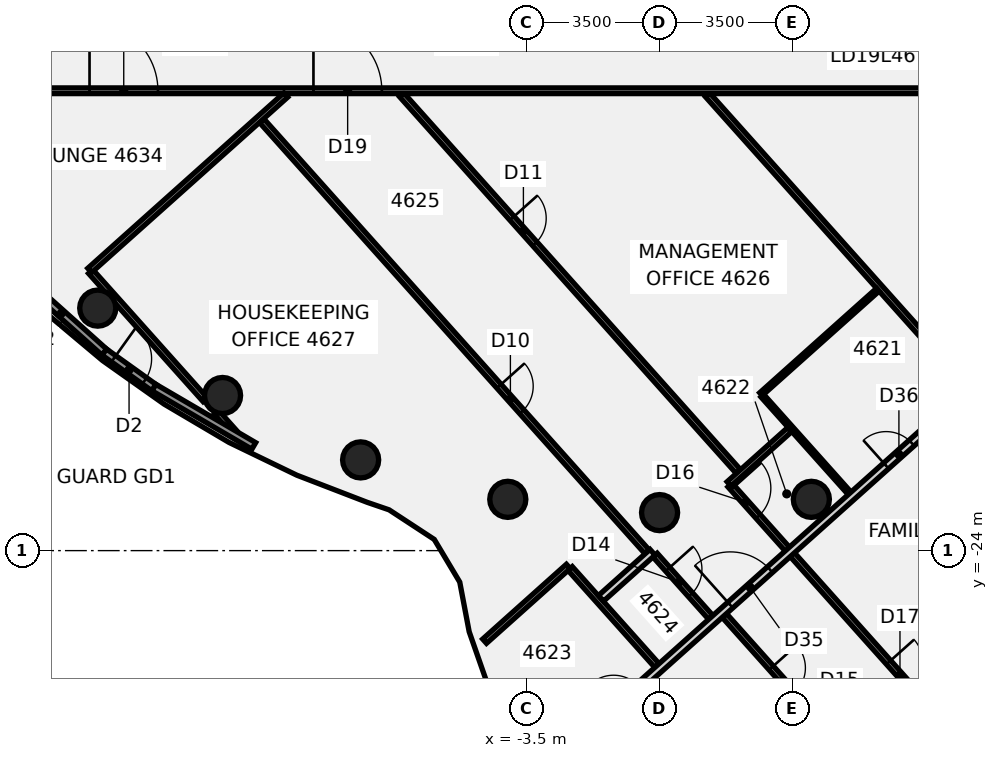
"""IFC4 building model, lengths in metres.
Left out: names, types, materials, properties, quantities, classifications, styles, units other than length and angle.
Written with IfcOpenShell. Run it as: python <this file> out.ifc"""

import sys

from ifc_helpers import new_model, si_unit, direction, frame, frame_2d, origin, origin_2d, place, context, subcontext, project, spatial, rectangle, circle, extrude, element, fill, save


model = new_model("IFC4")
c1 = context("Model", 3, precision=1e-05, world=origin(), true_north=direction((0.0, 1.0)))
c2 = subcontext(c1, "Body", "Model", "MODEL_VIEW")
j1 = project(units=[si_unit("LENGTHUNIT", "METRE"), si_unit("PLANEANGLEUNIT", "RADIAN")], contexts=[c1])
p1 = place(None, origin())
s1 = spatial("IfcSite", under=j1, at=p1, CompositionType="ELEMENT")
p2 = place(p1, origin())
s2 = spatial("IfcBuilding", under=s1, at=p2, CompositionType="ELEMENT")
p3 = place(p2, frame((0.0, 0.0, 186.1)))
s3 = spatial("IfcBuildingStorey", under=s2, at=p3, CompositionType="ELEMENT", Elevation=186.1)
for number, where, z_axis, x_axis in (
    (1, (-14.784, -17.619, -0.14), (0.0, 0.0, 1.0), (1.0, 0.0, 0.0)),
    (2, (-11.5, -19.919, -0.14), (0.0, 0.0, 1.0), (1.0, 0.0, 0.0)),
    (3, (-7.866, -21.613, -0.14), (0.0, 0.0, 1.0), (1.0, 0.0, 0.0)),
    (4, (-3.994, -22.651, -0.14), (0.0, 0.0, 1.0), (1.0, 0.0, 0.0)),
    (5, (0.0, -23.0, -0.14), (0.0, 0.0, 1.0), (1.0, 0.0, 0.0)),
    (6, (3.994, -22.651, -0.14), (0.0, 0.0, 1.0), (1.0, 0.0, 0.0)),
):
    element("IfcColumn", number, at=place(p3, frame(where, z_axis=z_axis, x_axis=x_axis)), inside=s3, PredefinedType="COLUMN", context=c2, shape_type="SweptSolid", body=[
        extrude(circle(Radius=0.475, at=origin_2d()), origin(), (0.0, 0.0, 1.0), 3.6),
    ])
p4 = place(p3, frame((-14.969, -16.657, 0.0), z_axis=(0.0, 0.0, 1.0), x_axis=(0.666348223985, -0.745640693895, 0.0)))
e7 = element("IfcWall", 7, at=p4, inside=s3, PredefinedType="PARTITIONING", context=c2, shape_type="SweptSolid", body=[
    extrude(rectangle(XDim=4.523, YDim=0.15, at=frame_2d((2.261, 0.0))), origin(), (0.0, 0.0, 1.0), 2.864),
])
p5 = place(p3, frame((-11.659, -20.361, 0.0), z_axis=(0.0, 0.0, 1.0), x_axis=(0.666420937465, -0.74557570649, 0.0)))
e8 = element("IfcWall", 8, at=p5, inside=s3, PredefinedType="PARTITIONING", context=c2, shape_type="SweptSolid", body=[
    extrude(rectangle(XDim=0.706, YDim=0.15, at=frame_2d((0.353, 0.0))), origin(), (0.0, 0.0, 1.0), 2.864),
])
p6 = place(p3, frame((-10.47, -12.688, 0.0), z_axis=(0.0, 0.0, 1.0), x_axis=(0.666418267017, -0.745578093419, 0.0)))
e9 = element("IfcWall", 9, at=p6, inside=s3, PredefinedType="PARTITIONING", context=c2, shape_type="SweptSolid", body=[
    extrude(rectangle(XDim=15.22, YDim=0.15, at=frame_2d((7.61, 0.0))), origin(), (0.0, 0.0, 1.0), 2.864),
])
p7 = place(p6, frame((9.37, 0.0, 0.0)))
e10 = element("IfcOpeningElement", 10, at=p7, cuts=e9, PredefinedType="OPENING", context=c2, shape_type="SweptSolid", body=[
    extrude(rectangle(XDim=0.9, YDim=2.1, at=frame_2d((0.45, 1.05))), frame((0.0, 0.085, 0.0), z_axis=(0.0, -1.0, 0.0), x_axis=(1.0, 0.0, 0.0)), (0.0, 0.0, 1.0), 0.17),
])
p8 = place(p3, frame((-6.785, -12.008, 0.0), z_axis=(0.0, 0.0, 1.0), x_axis=(0.666416805169, -0.745579400056, 0.0)))
e11 = element("IfcWall", 11, at=p8, inside=s3, PredefinedType="PARTITIONING", context=c2, shape_type="SweptSolid", body=[
    extrude(rectangle(XDim=13.292, YDim=0.15, at=frame_2d((6.646, 0.0))), origin(), (0.0, 0.0, 1.0), 2.864),
])
p9 = place(p8, frame((4.355, 0.0, 0.0)))
e12 = element("IfcOpeningElement", 12, at=p9, cuts=e11, PredefinedType="OPENING", context=c2, shape_type="SweptSolid", body=[
    extrude(rectangle(XDim=0.9, YDim=2.1, at=frame_2d((0.45, 1.05))), frame((0.0, 0.085, 0.0), z_axis=(0.0, -1.0, 0.0), x_axis=(1.0, 0.0, 0.0)), (0.0, 0.0, 1.0), 0.17),
])
p10 = place(p3, frame((-2.352, -24.471, 0.0), z_axis=(0.0, 0.0, 1.0), x_axis=(0.666436387123, -0.745561896772, 0.0)))
e13 = element("IfcWall", 13, at=p10, inside=s3, PredefinedType="PARTITIONING", context=c2, shape_type="SweptSolid", body=[
    extrude(rectangle(XDim=3.425, YDim=0.15, at=frame_2d((1.712, 0.0))), origin(), (0.0, 0.0, 1.0), 2.864),
])
p11 = place(p3, frame((-0.118, -24.118, 0.0), z_axis=(0.0, 0.0, 1.0), x_axis=(0.666262717409, -0.745717098765, 0.0)))
e14 = element("IfcWall", 14, at=p11, inside=s3, PredefinedType="PARTITIONING", context=c2, shape_type="SweptSolid", body=[
    extrude(rectangle(XDim=2.2, YDim=0.15, at=frame_2d((1.1, 0.0))), origin(), (0.0, 0.0, 1.0), 2.864),
])
p12 = place(p11, frame((0.5, 0.0, 0.0)))
e15 = element("IfcOpeningElement", 15, at=p12, cuts=e14, PredefinedType="OPENING", context=c2, shape_type="SweptSolid", body=[
    extrude(rectangle(XDim=0.9, YDim=2.1, at=frame_2d((0.45, 1.05))), frame((0.0, 0.085, 0.0), z_axis=(0.0, -1.0, 0.0), x_axis=(1.0, 0.0, 0.0)), (0.0, 0.0, 1.0), 0.17),
])
p13 = place(p3, frame((1.263, -12.008, 0.0), z_axis=(0.0, 0.0, 1.0), x_axis=(0.666447481512, -0.745551979668, 0.0)))
e16 = element("IfcWall", 16, at=p13, inside=s3, PredefinedType="PARTITIONING", context=c2, shape_type="SweptSolid", body=[
    extrude(rectangle(XDim=14.651, YDim=0.15, at=frame_2d((7.325, 0.0))), origin(), (0.0, 0.0, 1.0), 2.864),
])
p14 = place(p3, frame((1.705, -25.708, 0.0), z_axis=(0.0, 0.0, 1.0), x_axis=(0.666414011684, -0.745581896931, 0.0)))
e17 = element("IfcWall", 17, at=p14, inside=s3, PredefinedType="PARTITIONING", context=c2, shape_type="SweptSolid", body=[
    extrude(rectangle(XDim=3.861, YDim=0.15, at=frame_2d((1.93, 0.0))), origin(), (0.0, 0.0, 1.0), 2.864),
])
p15 = place(p14, frame((1.85, 0.0, 0.0)))
e18 = element("IfcOpeningElement", 18, at=p15, cuts=e17, PredefinedType="OPENING", context=c2, shape_type="SweptSolid", body=[
    extrude(rectangle(XDim=0.9, YDim=2.1, at=frame_2d((0.45, 1.05))), frame((0.0, 0.085, 0.0), z_axis=(0.0, -1.0, 0.0), x_axis=(1.0, 0.0, 0.0)), (0.0, 0.0, 1.0), 0.17),
])
p16 = place(p3, frame((1.855, -22.274, 0.0), z_axis=(0.0, 0.0, 1.0), x_axis=(0.666398150621, -0.74559607352, 0.0)))
e19 = element("IfcWall", 19, at=p16, inside=s3, PredefinedType="PARTITIONING", context=c2, shape_type="SweptSolid", body=[
    extrude(rectangle(XDim=15.78, YDim=0.15, at=frame_2d((7.89, 0.0))), origin(), (0.0, 0.0, 1.0), 2.864),
])
p17 = place(p16, frame((0.11, 0.0, 0.0)))
e20 = element("IfcOpeningElement", 20, at=p17, cuts=e19, PredefinedType="OPENING", context=c2, shape_type="SweptSolid", body=[
    extrude(rectangle(XDim=1.0, YDim=2.1, at=frame_2d((0.5, 1.05))), frame((0.0, 0.085, 0.0), z_axis=(0.0, -1.0, 0.0), x_axis=(1.0, 0.0, 0.0)), (0.0, 0.0, 1.0), 0.17),
])
p18 = place(p16, frame((6.26, 0.0, 0.0)))
e21 = element("IfcOpeningElement", 21, at=p18, cuts=e19, PredefinedType="OPENING", context=c2, shape_type="SweptSolid", body=[
    extrude(rectangle(XDim=0.9, YDim=2.1, at=frame_2d((0.45, 1.05))), frame((0.0, 0.085, 0.0), z_axis=(0.0, -1.0, 0.0), x_axis=(1.0, 0.0, 0.0)), (0.0, 0.0, 1.0), 0.17),
])
p19 = place(p16, frame((14.31, 0.0, 0.0)))
e22 = element("IfcOpeningElement", 22, at=p19, cuts=e19, PredefinedType="OPENING", context=c2, shape_type="SweptSolid", body=[
    extrude(rectangle(XDim=0.9, YDim=2.1, at=frame_2d((0.45, 1.05))), frame((0.0, 0.085, 0.0), z_axis=(0.0, -1.0, 0.0), x_axis=(1.0, 0.0, 0.0)), (0.0, 0.0, 1.0), 0.17),
])
p20 = place(p3, frame((2.705, -19.924, 0.0), z_axis=(0.0, 0.0, 1.0), x_axis=(0.666455053582, -0.74554521094, 0.0)))
e23 = element("IfcWall", 23, at=p20, inside=s3, PredefinedType="PARTITIONING", context=c2, shape_type="SweptSolid", body=[
    extrude(rectangle(XDim=3.445, YDim=0.1, at=frame_2d((1.722, 0.0))), origin(), (0.0, 0.0, 1.0), 2.864),
])
p21 = place(p3, frame((-17.1, -11.9, 0.0), z_axis=(0.0, 0.0, 1.0), x_axis=(1.0, 0.0, 0.0)))
e24 = element("IfcWall", 24, at=p21, inside=s3, PredefinedType="PARTITIONING", context=c2, shape_type="SweptSolid", body=[
    extrude(rectangle(XDim=34.165, YDim=0.15, at=frame_2d((17.083, 0.0))), origin(), (0.0, 0.0, 1.0), 2.864),
])
p22 = place(p21, frame((7.992, 0.0, 0.0)))
e25 = element("IfcOpeningElement", 25, at=p22, cuts=e24, PredefinedType="OPENING", context=c2, shape_type="SweptSolid", body=[
    extrude(rectangle(XDim=1.8, YDim=2.1, at=frame_2d((0.9, 1.05))), frame((0.0, 0.085, 0.0), z_axis=(0.0, -1.0, 0.0), x_axis=(1.0, 0.0, 0.0)), (0.0, 0.0, 1.0), 0.17),
])
p23 = place(p21, frame((2.1, 0.0, 0.0)))
e26 = element("IfcOpeningElement", 26, at=p23, cuts=e24, PredefinedType="OPENING", context=c2, shape_type="SweptSolid", body=[
    extrude(rectangle(XDim=1.8, YDim=2.1, at=frame_2d((0.9, 1.05))), frame((0.0, 0.085, 0.0), z_axis=(0.0, -1.0, 0.0), x_axis=(1.0, 0.0, 0.0)), (0.0, 0.0, 1.0), 0.17),
])
p24 = place(p21, frame((25.316, 0.0, 0.0)))
e27 = element("IfcOpeningElement", 27, at=p24, cuts=e24, PredefinedType="OPENING", context=c2, shape_type="SweptSolid", body=[
    extrude(rectangle(XDim=1.8, YDim=2.1, at=frame_2d((0.9, 1.05))), frame((0.0, 0.085, 0.0), z_axis=(0.0, -1.0, 0.0), x_axis=(1.0, 0.0, 0.0)), (0.0, 0.0, 1.0), 0.17),
])
p25 = place(p3, frame((-14.996, -16.627, 0.0), z_axis=(0.0, 0.0, 1.0), x_axis=(0.74550136181, 0.666504103167, 0.0)))
e28 = element("IfcWall", 28, at=p25, inside=s3, PredefinedType="PARTITIONING", context=c2, shape_type="SweptSolid", body=[
    extrude(rectangle(XDim=6.923, YDim=0.15, at=frame_2d((3.461, 0.0))), origin(), (0.0, 0.0, 1.0), 2.864),
])
p26 = place(p3, frame((-4.604, -26.383, 0.0), z_axis=(0.0, 0.0, 1.0), x_axis=(0.745591433962, 0.66640334153, 0.0)))
e29 = element("IfcWall", 29, at=p26, inside=s3, PredefinedType="PARTITIONING", context=c2, shape_type="SweptSolid", body=[
    extrude(rectangle(XDim=2.954, YDim=0.15, at=frame_2d((1.477, 0.0))), origin(), (0.0, 0.0, 1.0), 2.864),
])
p27 = place(p3, frame((2.668, -19.883, 0.0), z_axis=(0.0, 0.0, 1.0), x_axis=(0.745587906821, 0.666407287777, 0.0)))
e30 = element("IfcWall", 30, at=p27, inside=s3, PredefinedType="PARTITIONING", context=c2, shape_type="SweptSolid", body=[
    extrude(rectangle(XDim=4.125, YDim=0.1, at=frame_2d((2.063, 0.0))), origin(), (0.0, 0.0, 1.0), 2.864),
])
p28 = place(p3, frame((-2.388, -29.231, 0.0), z_axis=(0.0, 0.0, 1.0), x_axis=(0.745635079119, 0.666354506841, 0.0)))
e31 = element("IfcWall", 31, at=p28, inside=s3, PredefinedType="PARTITIONING", context=c2, shape_type="SweptSolid", body=[
    extrude(rectangle(XDim=14.119, YDim=0.2, at=frame_2d((7.06, 0.0))), origin(), (0.0, 0.0, 1.0), 2.864),
])
p29 = place(p28, frame((5.699, 0.0, 0.0)))
e32 = element("IfcOpeningElement", 32, at=p29, cuts=e31, PredefinedType="OPENING", context=c2, shape_type="SweptSolid", body=[
    extrude(rectangle(XDim=1.4, YDim=2.1, at=frame_2d((0.7, 1.05))), frame((0.0, 0.11, 0.0), z_axis=(0.0, -1.0, 0.0), x_axis=(1.0, 0.0, 0.0)), (0.0, 0.0, 1.0), 0.22),
])
p30 = place(p28, frame((11.199, 0.0, 0.0)))
e33 = element("IfcOpeningElement", 33, at=p30, cuts=e31, PredefinedType="OPENING", context=c2, shape_type="SweptSolid", body=[
    extrude(rectangle(XDim=0.9, YDim=2.1, at=frame_2d((0.45, 1.05))), frame((0.0, 0.11, 0.0), z_axis=(0.0, -1.0, 0.0), x_axis=(1.0, 0.0, 0.0)), (0.0, 0.0, 1.0), 0.22),
])
p31 = place(p28, frame((1.579, 0.0, 0.0)))
e34 = element("IfcOpeningElement", 34, at=p31, cuts=e31, PredefinedType="OPENING", context=c2, shape_type="SweptSolid", body=[
    extrude(rectangle(XDim=0.9, YDim=2.1, at=frame_2d((0.45, 1.05))), frame((0.0, 0.11, 0.0), z_axis=(0.0, -1.0, 0.0), x_axis=(1.0, 0.0, 0.0)), (0.0, 0.0, 1.0), 0.22),
])
p32 = place(p3, frame((-1.542, -25.257, 0.0), z_axis=(0.0, 0.0, 1.0), x_axis=(0.745490239636, 0.666516543387, 0.0)))
e35 = element("IfcWall", 35, at=p32, inside=s3, PredefinedType="PARTITIONING", context=c2, shape_type="SweptSolid", body=[
    extrude(rectangle(XDim=1.821, YDim=0.2, at=frame_2d((0.91, 0.0))), origin(), (0.0, 0.0, 1.0), 2.864),
])
p33 = place(p3, frame((1.827, -22.243, 0.0), z_axis=(0.0, 0.0, 1.0), x_axis=(0.74553667449, 0.666464602953, 0.0)))
e36 = element("IfcWall", 36, at=p33, inside=s3, PredefinedType="PARTITIONING", context=c2, shape_type="SweptSolid", body=[
    extrude(rectangle(XDim=2.14, YDim=0.15, at=frame_2d((1.07, 0.0))), origin(), (0.0, 0.0, 1.0), 2.864),
])
p34 = place(p3, frame((-16.881, -16.743, 0.0), z_axis=(0.0, 0.0, 1.0), x_axis=(0.744845286736, -0.667237213311, 0.0)))
e37 = element("IfcWall", 37, at=p34, inside=s3, PredefinedType="SOLIDWALL", context=c2, shape_type="SweptSolid", body=[
    extrude(rectangle(XDim=3.048, YDim=0.2, at=frame_2d((1.524, 0.0))), origin(), (0.0, 0.0, 1.0), 3.46),
])
p35 = place(p3, frame((-13.309, -19.708, 0.0), z_axis=(0.0, 0.0, 1.0), x_axis=(0.863304849932, -0.504682807399, 0.0)))
e38 = element("IfcWall", 38, at=p35, inside=s3, PredefinedType="SOLIDWALL", context=c2, shape_type="SweptSolid", body=[
    extrude(rectangle(XDim=3.047, YDim=0.2, at=frame_2d((1.523, 0.0))), origin(), (0.0, 0.0, 1.0), 3.46),
])
p36 = place(p3, frame((-14.611, -18.777, 0.0), z_axis=(0.0, 0.0, 1.0), x_axis=(0.81345495277, -0.58162792214, 0.0)))
e39 = element("IfcWall", 39, at=p36, inside=s3, PredefinedType="SOLIDWALL", context=c2, shape_type="SweptSolid", body=[
    extrude(rectangle(XDim=1.6, YDim=0.2, at=frame_2d((0.8, 0.0))), origin(), (0.0, 0.0, 1.0), 3.46),
])
p37 = place(p36, frame((0.3, 0.0, 0.0)))
e40 = element("IfcOpeningElement", 40, at=p37, cuts=e39, PredefinedType="OPENING", context=c2, shape_type="SweptSolid", body=[
    extrude(rectangle(XDim=1.0, YDim=2.4, at=frame_2d((0.5, 1.2))), frame((0.0, 0.11, 0.0), z_axis=(0.0, -1.0, 0.0), x_axis=(1.0, 0.0, 0.0)), (0.0, 0.0, 1.0), 0.22),
])
p38 = place(p7, frame((0.9, 0.0, 0.0), z_axis=(0.0, 0.0, 1.0), x_axis=(-1.0, 0.0, 0.0)))
e41 = element("IfcDoor", 41, at=p38, inside=s3, OperationType="SINGLE_SWING_RIGHT", PredefinedType="DOOR", context=c2, shape_type="SweptSolid", body=[
    extrude(rectangle(XDim=0.9, YDim=2.1, at=frame_2d((0.45, 1.05))), frame((0.0, 0.025, 0.0), z_axis=(0.0, -1.0, 0.0), x_axis=(1.0, 0.0, 0.0)), (0.0, 0.0, 1.0), 0.05),
])
fill(e10, e41)
p39 = place(p9, origin())
e42 = element("IfcDoor", 42, at=p39, inside=s3, OperationType="SINGLE_SWING_RIGHT", PredefinedType="DOOR", context=c2, shape_type="SweptSolid", body=[
    extrude(rectangle(XDim=0.9, YDim=2.1, at=frame_2d((0.45, 1.05))), frame((0.0, 0.025, 0.0), z_axis=(0.0, -1.0, 0.0), x_axis=(1.0, 0.0, 0.0)), (0.0, 0.0, 1.0), 0.05),
])
fill(e12, e42)
p40 = place(p12, frame((0.9, 0.0, 0.0), z_axis=(0.0, 0.0, 1.0), x_axis=(-1.0, 0.0, 0.0)))
e43 = element("IfcDoor", 43, at=p40, inside=s3, OperationType="SINGLE_SWING_LEFT", PredefinedType="DOOR", context=c2, shape_type="SweptSolid", body=[
    extrude(rectangle(XDim=0.9, YDim=2.1, at=frame_2d((0.45, 1.05))), frame((0.0, 0.025, 0.0), z_axis=(0.0, -1.0, 0.0), x_axis=(1.0, 0.0, 0.0)), (0.0, 0.0, 1.0), 0.05),
])
fill(e15, e43)
p41 = place(p15, frame((0.9, 0.0, 0.0), z_axis=(0.0, 0.0, 1.0), x_axis=(-1.0, 0.0, 0.0)))
e44 = element("IfcDoor", 44, at=p41, inside=s3, OperationType="SINGLE_SWING_RIGHT", PredefinedType="DOOR", context=c2, shape_type="SweptSolid", body=[
    extrude(rectangle(XDim=0.9, YDim=2.1, at=frame_2d((0.45, 1.05))), frame((0.0, 0.025, 0.0), z_axis=(0.0, -1.0, 0.0), x_axis=(1.0, 0.0, 0.0)), (0.0, 0.0, 1.0), 0.05),
])
fill(e18, e44)
p42 = place(p17, origin())
e45 = element("IfcDoor", 45, at=p42, inside=s3, OperationType="SINGLE_SWING_RIGHT", PredefinedType="DOOR", context=c2, shape_type="SweptSolid", body=[
    extrude(rectangle(XDim=1.0, YDim=2.1, at=frame_2d((0.5, 1.05))), frame((0.0, 0.025, 0.0), z_axis=(0.0, -1.0, 0.0), x_axis=(1.0, 0.0, 0.0)), (0.0, 0.0, 1.0), 0.05),
])
fill(e20, e45)
p43 = place(p18, origin())
e46 = element("IfcDoor", 46, at=p43, inside=s3, OperationType="SINGLE_SWING_RIGHT", PredefinedType="DOOR", context=c2, shape_type="SweptSolid", body=[
    extrude(rectangle(XDim=0.9, YDim=2.1, at=frame_2d((0.45, 1.05))), frame((0.0, 0.025, 0.0), z_axis=(0.0, -1.0, 0.0), x_axis=(1.0, 0.0, 0.0)), (0.0, 0.0, 1.0), 0.05),
])
fill(e21, e46)
p44 = place(p22, origin())
e47 = element("IfcDoor", 47, at=p44, inside=s3, OperationType="DOUBLE_DOOR_SINGLE_SWING", PredefinedType="DOOR", context=c2, shape_type="SweptSolid", body=[
    extrude(rectangle(XDim=1.8, YDim=2.1, at=frame_2d((0.9, 1.05))), frame((0.0, 0.025, 0.0), z_axis=(0.0, -1.0, 0.0), x_axis=(1.0, 0.0, 0.0)), (0.0, 0.0, 1.0), 0.05),
])
fill(e25, e47)
p45 = place(p23, frame((1.8, 0.0, 0.0), z_axis=(0.0, 0.0, 1.0), x_axis=(-1.0, 0.0, 0.0)))
e48 = element("IfcDoor", 48, at=p45, inside=s3, OperationType="DOUBLE_DOOR_SINGLE_SWING", PredefinedType="DOOR", context=c2, shape_type="SweptSolid", body=[
    extrude(rectangle(XDim=1.8, YDim=2.1, at=frame_2d((0.9, 1.05))), frame((0.0, 0.025, 0.0), z_axis=(0.0, -1.0, 0.0), x_axis=(1.0, 0.0, 0.0)), (0.0, 0.0, 1.0), 0.05),
])
fill(e26, e48)
p46 = place(p29, origin())
e49 = element("IfcDoor", 49, at=p46, inside=s3, OperationType="DOUBLE_DOOR_SINGLE_SWING", PredefinedType="DOOR", context=c2, shape_type="SweptSolid", body=[
    extrude(rectangle(XDim=1.4, YDim=2.1, at=frame_2d((0.7, 1.05))), frame((0.0, 0.025, 0.0), z_axis=(0.0, -1.0, 0.0), x_axis=(1.0, 0.0, 0.0)), (0.0, 0.0, 1.0), 0.05),
])
fill(e32, e49)
p47 = place(p30, origin())
e50 = element("IfcDoor", 50, at=p47, inside=s3, OperationType="SINGLE_SWING_LEFT", PredefinedType="DOOR", context=c2, shape_type="SweptSolid", body=[
    extrude(rectangle(XDim=0.9, YDim=2.1, at=frame_2d((0.45, 1.05))), frame((0.0, 0.025, 0.0), z_axis=(0.0, -1.0, 0.0), x_axis=(1.0, 0.0, 0.0)), (0.0, 0.0, 1.0), 0.05),
])
fill(e33, e50)
p48 = place(p37, origin())
e51 = element("IfcDoor", 51, at=p48, inside=s3, OperationType="SINGLE_SWING_LEFT", PredefinedType="DOOR", context=c2, shape_type="SweptSolid", body=[
    extrude(rectangle(XDim=1.0, YDim=2.4, at=frame_2d((0.5, 1.2))), frame((0.0, 0.025, 0.0), z_axis=(0.0, -1.0, 0.0), x_axis=(1.0, 0.0, 0.0)), (0.0, 0.0, 1.0), 0.05),
])
fill(e40, e51)
save(model, sys.argv[1])
